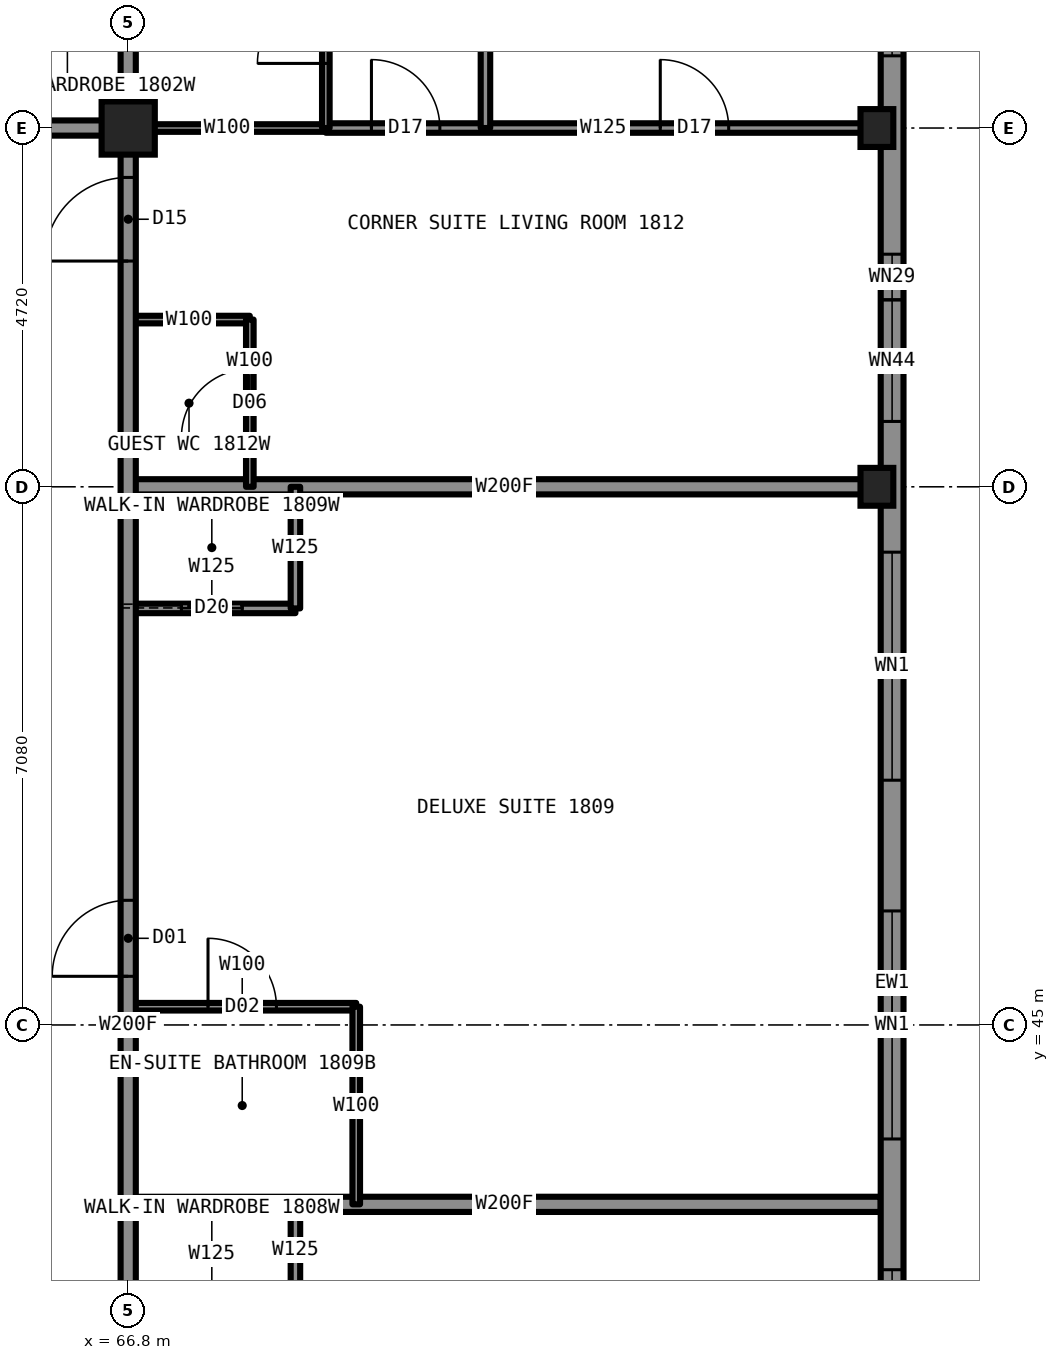
"""IFC4 building model, lengths in metres.
Left out: names, types, materials, properties, quantities, classifications, styles, units other than length and angle.
Written with IfcOpenShell. Run it as: python <this file> out.ifc"""

import sys

from ifc_helpers import new_model, si_unit, direction, frame, frame_2d, origin, origin_2d, place, context, subcontext, project, spatial, rectangle, hollow_rectangle, i_section, extrude, element, fill, save


model = new_model("IFC4")
c1 = context("Model", 3, precision=1e-05, world=origin(), true_north=direction((0.0, 1.0)))
c2 = subcontext(c1, "Body", "Model", "MODEL_VIEW")
j1 = project(units=[si_unit("LENGTHUNIT", "METRE"), si_unit("PLANEANGLEUNIT", "RADIAN")], contexts=[c1])
p1 = place(None, origin())
s1 = spatial("IfcSite", under=j1, at=p1, CompositionType="ELEMENT")
p2 = place(p1, origin())
s2 = spatial("IfcBuilding", under=s1, at=p2, CompositionType="ELEMENT")
p3 = place(p2, frame((0.0, 0.0, 70.5)))
s3 = spatial("IfcBuildingStorey", under=s2, at=p3, CompositionType="ELEMENT", Elevation=70.5)
for number, where, z_axis, x_axis in (
    (1, (76.65, 52.08, 0.0), (0.0, 0.0, 1.0), (1.0, 0.0, 0.0)),
    (2, (76.65, 56.8, 0.0), (0.0, 0.0, 1.0), (1.0, 0.0, 0.0)),
):
    element("IfcColumn", number, at=place(p3, frame(where, z_axis=z_axis, x_axis=x_axis)), inside=s3, PredefinedType="COLUMN", context=c2, shape_type="SweptSolid", body=[
        extrude(i_section(OverallWidth=0.432, OverallDepth=0.498, WebThickness=0.056, FlangeThickness=0.089, at=origin_2d()), origin(), (0.0, 0.0, 1.0), 3.5),
    ])
p4 = place(p3, frame((66.8, 56.8, 0.0), z_axis=(0.0, 0.0, 1.0), x_axis=(1.0, 0.0, 0.0)))
e3 = element("IfcColumn", 3, at=p4, inside=s3, PredefinedType="COLUMN", context=c2, shape_type="SweptSolid", body=[
    extrude(hollow_rectangle(XDim=0.7, YDim=0.7, WallThickness=0.06, at=origin_2d()), origin(), (0.0, 0.0, 1.0), 3.5),
])
p5 = place(p3, frame((66.8, 42.64, 0.0), z_axis=(0.0, 0.0, 1.0), x_axis=(1.0, 0.0, 0.0)))
e4 = element("IfcWall", 4, at=p5, inside=s3, PredefinedType="PARTITIONING", context=c2, shape_type="SweptSolid", body=[
    extrude(rectangle(XDim=9.9, YDim=0.2, at=frame_2d((4.95, 0.0))), origin(), (0.0, 0.0, 1.0), 2.723),
])
p6 = place(p3, frame((66.8, 45.24, 0.0), z_axis=(0.0, 0.0, 1.0), x_axis=(1.0, 0.0, 0.0)))
e5 = element("IfcWall", 5, at=p6, inside=s3, PredefinedType="PARTITIONING", context=c2, shape_type="SweptSolid", body=[
    extrude(rectangle(XDim=3.0, YDim=0.1, at=frame_2d((1.5, 0.0))), origin(), (0.0, 0.0, 1.0), 3.33),
])
p7 = place(p6, frame((1.05, 0.0, 0.0)))
e6 = element("IfcOpeningElement", 6, at=p7, cuts=e5, PredefinedType="OPENING", context=c2, shape_type="SweptSolid", body=[
    extrude(rectangle(XDim=0.9, YDim=2.1, at=frame_2d((0.45, 1.05))), frame((0.0, 0.06, 0.0), z_axis=(0.0, -1.0, 0.0), x_axis=(1.0, 0.0, 0.0)), (0.0, 0.0, 1.0), 0.12),
])
p8 = place(p3, frame((66.8, 56.8, 0.0), z_axis=(0.0, 0.0, 1.0), x_axis=(1.0, 0.0, 0.0)))
e7 = element("IfcWall", 7, at=p8, inside=s3, PredefinedType="PARTITIONING", context=c2, shape_type="SweptSolid", body=[
    extrude(rectangle(XDim=2.6, YDim=0.1, at=frame_2d((1.3, 0.0))), origin(), (0.0, 0.0, 1.0), 2.573),
])
p9 = place(p3, frame((43.2, 56.8, 0.0), z_axis=(0.0, 0.0, 1.0), x_axis=(1.0, 0.0, 0.0)))
e8 = element("IfcWall", 8, at=p9, inside=s3, PredefinedType="PARTITIONING", context=c2, shape_type="SweptSolid", body=[
    extrude(rectangle(XDim=23.6, YDim=0.2, at=frame_2d((11.8, 0.0))), origin(), (0.0, 0.0, 1.0), 3.33),
])
p10 = place(p9, frame((1.85, 0.0, 0.0)))
e9 = element("IfcOpeningElement", 9, at=p10, cuts=e8, PredefinedType="OPENING", context=c2, shape_type="SweptSolid", body=[
    extrude(rectangle(XDim=1.1, YDim=2.2, at=frame_2d((0.55, 1.1))), frame((0.0, 0.11, 0.0), z_axis=(0.0, -1.0, 0.0), x_axis=(1.0, 0.0, 0.0)), (0.0, 0.0, 1.0), 0.22),
])
p11 = place(p9, frame((17.16, 0.0, 0.0)))
e10 = element("IfcOpeningElement", 10, at=p11, cuts=e8, PredefinedType="OPENING", context=c2, shape_type="SweptSolid", body=[
    extrude(rectangle(XDim=1.0, YDim=2.2, at=frame_2d((0.5, 1.1))), frame((0.0, 0.11, 0.0), z_axis=(0.0, -1.0, 0.0), x_axis=(1.0, 0.0, 0.0)), (0.0, 0.0, 1.0), 0.22),
])
p12 = place(p3, frame((69.4, 56.8, 0.0), z_axis=(0.0, 0.0, 1.0), x_axis=(1.0, 0.0, 0.0)))
e11 = element("IfcWall", 11, at=p12, inside=s3, PredefinedType="PARTITIONING", context=c2, shape_type="SweptSolid", body=[
    extrude(rectangle(XDim=7.3, YDim=0.125, at=frame_2d((3.65, 0.0))), origin(), (0.0, 0.0, 1.0), 2.573),
])
p13 = place(p12, frame((0.6, 0.0, 0.0)))
e12 = element("IfcOpeningElement", 12, at=p13, cuts=e11, PredefinedType="OPENING", context=c2, shape_type="SweptSolid", body=[
    extrude(rectangle(XDim=0.9, YDim=2.2, at=frame_2d((0.45, 1.1))), frame((0.0, 0.073, 0.0), z_axis=(0.0, -1.0, 0.0), x_axis=(1.0, 0.0, 0.0)), (0.0, 0.0, 1.0), 0.145),
])
p14 = place(p12, frame((4.4, 0.0, 0.0)))
e13 = element("IfcOpeningElement", 13, at=p14, cuts=e11, PredefinedType="OPENING", context=c2, shape_type="SweptSolid", body=[
    extrude(rectangle(XDim=0.9, YDim=2.2, at=frame_2d((0.45, 1.1))), frame((0.0, 0.073, 0.0), z_axis=(0.0, -1.0, 0.0), x_axis=(1.0, 0.0, 0.0)), (0.0, 0.0, 1.0), 0.145),
])
p15 = place(p3, frame((66.8, 50.48, 0.0), z_axis=(0.0, 0.0, 1.0), x_axis=(1.0, 0.0, 0.0)))
e14 = element("IfcWall", 14, at=p15, inside=s3, PredefinedType="PARTITIONING", context=c2, shape_type="SweptSolid", body=[
    extrude(rectangle(XDim=2.2, YDim=0.125, at=frame_2d((1.1, 0.0))), origin(), (0.0, 0.0, 1.0), 3.33),
])
p16 = place(p15, frame((0.7, 0.0, 0.0)))
e15 = element("IfcOpeningElement", 15, at=p16, cuts=e14, PredefinedType="OPENING", context=c2, shape_type="SweptSolid", body=[
    extrude(rectangle(XDim=0.8, YDim=2.1, at=frame_2d((0.4, 1.05))), frame((0.0, 0.073, 0.0), z_axis=(0.0, -1.0, 0.0), x_axis=(1.0, 0.0, 0.0)), (0.0, 0.0, 1.0), 0.145),
])
p17 = place(p3, frame((66.8, 52.08, 0.0), z_axis=(0.0, 0.0, 1.0), x_axis=(1.0, 0.0, 0.0)))
e16 = element("IfcWall", 16, at=p17, inside=s3, PredefinedType="PARTITIONING", context=c2, shape_type="SweptSolid", body=[
    extrude(rectangle(XDim=9.9, YDim=0.2, at=frame_2d((4.95, 0.0))), origin(), (0.0, 0.0, 1.0), 2.573),
])
p18 = place(p3, frame((66.8, 54.28, 0.0), z_axis=(0.0, 0.0, 1.0), x_axis=(1.0, 0.0, 0.0)))
e17 = element("IfcWall", 17, at=p18, inside=s3, PredefinedType="PARTITIONING", context=c2, shape_type="SweptSolid", body=[
    extrude(rectangle(XDim=1.6, YDim=0.1, at=frame_2d((0.8, 0.0))), origin(), (0.0, 0.0, 1.0), 2.723),
])
p19 = place(p3, frame((66.8, 33.2, 0.0), z_axis=(0.0, 0.0, 1.0), x_axis=(0.0, 1.0, 0.0)))
e18 = element("IfcWall", 18, at=p19, inside=s3, PredefinedType="PARTITIONING", context=c2, shape_type="SweptSolid", body=[
    extrude(rectangle(XDim=23.6, YDim=0.2, at=frame_2d((11.8, 0.0))), origin(), (0.0, 0.0, 1.0), 3.33),
])
p20 = place(p19, frame((6.98, 0.0, 0.0)))
e19 = element("IfcOpeningElement", 19, at=p20, cuts=e18, PredefinedType="OPENING", context=c2, shape_type="SweptSolid", body=[
    extrude(rectangle(XDim=1.0, YDim=2.2, at=frame_2d((0.5, 1.1))), frame((0.0, 0.11, 0.0), z_axis=(0.0, -1.0, 0.0), x_axis=(1.0, 0.0, 0.0)), (0.0, 0.0, 1.0), 0.22),
])
p21 = place(p19, frame((12.44, 0.0, 0.0)))
e20 = element("IfcOpeningElement", 20, at=p21, cuts=e18, PredefinedType="OPENING", context=c2, shape_type="SweptSolid", body=[
    extrude(rectangle(XDim=1.0, YDim=2.2, at=frame_2d((0.5, 1.1))), frame((0.0, 0.11, 0.0), z_axis=(0.0, -1.0, 0.0), x_axis=(1.0, 0.0, 0.0)), (0.0, 0.0, 1.0), 0.22),
])
p22 = place(p19, frame((21.85, 0.0, 0.0)))
e21 = element("IfcOpeningElement", 21, at=p22, cuts=e18, PredefinedType="OPENING", context=c2, shape_type="SweptSolid", body=[
    extrude(rectangle(XDim=1.1, YDim=2.2, at=frame_2d((0.55, 1.1))), frame((0.0, 0.11, 0.0), z_axis=(0.0, -1.0, 0.0), x_axis=(1.0, 0.0, 0.0)), (0.0, 0.0, 1.0), 0.22),
])
p23 = place(p19, frame((0.66, 0.0, 0.0)))
e22 = element("IfcOpeningElement", 22, at=p23, cuts=e18, PredefinedType="OPENING", context=c2, shape_type="SweptSolid", body=[
    extrude(rectangle(XDim=1.1, YDim=2.2, at=frame_2d((0.55, 1.1))), frame((0.0, 0.11, 0.0), z_axis=(0.0, -1.0, 0.0), x_axis=(1.0, 0.0, 0.0)), (0.0, 0.0, 1.0), 0.22),
])
p24 = place(p3, frame((66.8, 56.8, 0.0), z_axis=(0.0, 0.0, 1.0), x_axis=(0.0, 1.0, 0.0)))
e23 = element("IfcWall", 23, at=p24, inside=s3, PredefinedType="PARTITIONING", context=c2, shape_type="SweptSolid", body=[
    extrude(rectangle(XDim=9.9, YDim=0.2, at=frame_2d((4.95, 0.0))), origin(), (0.0, 0.0, 1.0), 2.573),
])
p25 = place(p3, frame((68.4, 52.08, 0.0), z_axis=(0.0, 0.0, 1.0), x_axis=(0.0, 1.0, 0.0)))
e24 = element("IfcWall", 24, at=p25, inside=s3, PredefinedType="PARTITIONING", context=c2, shape_type="SweptSolid", body=[
    extrude(rectangle(XDim=2.2, YDim=0.1, at=frame_2d((1.1, 0.0))), origin(), (0.0, 0.0, 1.0), 3.33),
])
p26 = place(p25, frame((0.65, 0.0, 0.0)))
e25 = element("IfcOpeningElement", 25, at=p26, cuts=e24, PredefinedType="OPENING", context=c2, shape_type="SweptSolid", body=[
    extrude(rectangle(XDim=0.9, YDim=2.1, at=frame_2d((0.45, 1.05))), frame((0.0, 0.06, 0.0), z_axis=(0.0, -1.0, 0.0), x_axis=(1.0, 0.0, 0.0)), (0.0, 0.0, 1.0), 0.12),
])
p27 = place(p3, frame((69.0, 41.44, 0.0), z_axis=(0.0, 0.0, 1.0), x_axis=(0.0, 1.0, 0.0)))
e26 = element("IfcWall", 26, at=p27, inside=s3, PredefinedType="PARTITIONING", context=c2, shape_type="SweptSolid", body=[
    extrude(rectangle(XDim=1.2, YDim=0.125, at=frame_2d((0.6, 0.0))), origin(), (0.0, 0.0, 1.0), 3.33),
])
p28 = place(p3, frame((69.0, 50.48, 0.0), z_axis=(0.0, 0.0, 1.0), x_axis=(0.0, 1.0, 0.0)))
e27 = element("IfcWall", 27, at=p28, inside=s3, PredefinedType="PARTITIONING", context=c2, shape_type="SweptSolid", body=[
    extrude(rectangle(XDim=1.6, YDim=0.125, at=frame_2d((0.8, 0.0))), origin(), (0.0, 0.0, 1.0), 3.33),
])
p29 = place(p3, frame((69.4, 56.8, 0.0), z_axis=(0.0, 0.0, 1.0), x_axis=(0.0, 1.0, 0.0)))
e28 = element("IfcWall", 28, at=p29, inside=s3, PredefinedType="PARTITIONING", context=c2, shape_type="SweptSolid", body=[
    extrude(rectangle(XDim=2.6, YDim=0.1, at=frame_2d((1.3, 0.0))), origin(), (0.0, 0.0, 1.0), 3.33),
])
p30 = place(p29, frame((0.85, 0.0, 0.0)))
e29 = element("IfcOpeningElement", 29, at=p30, cuts=e28, PredefinedType="OPENING", context=c2, shape_type="SweptSolid", body=[
    extrude(rectangle(XDim=0.9, YDim=2.1, at=frame_2d((0.45, 1.05))), frame((0.0, 0.06, 0.0), z_axis=(0.0, -1.0, 0.0), x_axis=(1.0, 0.0, 0.0)), (0.0, 0.0, 1.0), 0.12),
])
p31 = place(p3, frame((69.8, 42.64, 0.0), z_axis=(0.0, 0.0, 1.0), x_axis=(0.0, 1.0, 0.0)))
e30 = element("IfcWall", 30, at=p31, inside=s3, PredefinedType="PARTITIONING", context=c2, shape_type="SweptSolid", body=[
    extrude(rectangle(XDim=2.6, YDim=0.1, at=frame_2d((1.3, 0.0))), origin(), (0.0, 0.0, 1.0), 3.33),
])
p32 = place(p3, frame((71.5, 56.8, 0.0), z_axis=(0.0, 0.0, 1.0), x_axis=(0.0, 1.0, 0.0)))
e31 = element("IfcWall", 31, at=p32, inside=s3, PredefinedType="PARTITIONING", context=c2, shape_type="SweptSolid", body=[
    extrude(rectangle(XDim=9.894, YDim=0.125, at=frame_2d((4.947, 0.0))), origin(), (0.0, 0.0, 1.0), 3.33),
])
p33 = place(p3, frame((76.85, 28.5, 0.0), z_axis=(0.0, 0.0, 1.0), x_axis=(0.0, 1.0, 0.0)))
e32 = element("IfcWall", 32, at=p33, inside=s3, PredefinedType="SOLIDWALL", context=c2, shape_type="SweptSolid", body=[
    extrude(rectangle(XDim=33.0, YDim=0.3, at=frame_2d((16.5, 0.0))), origin(), (0.0, 0.0, 1.0), 2.83),
])
p34 = place(p33, frame((0.85, 0.0, 0.5)))
e33 = element("IfcOpeningElement", 33, at=p34, cuts=e32, PredefinedType="OPENING", context=c2, shape_type="SweptSolid", body=[
    extrude(rectangle(XDim=2.9, YDim=2.0, at=frame_2d((1.45, 1.0))), frame((0.0, 0.16, 0.0), z_axis=(0.0, -1.0, 0.0), x_axis=(1.0, 0.0, 0.0)), (0.0, 0.0, 1.0), 0.32),
])
p35 = place(p33, frame((6.96, 0.0, 0.55)))
e34 = element("IfcOpeningElement", 34, at=p35, cuts=e32, PredefinedType="OPENING", context=c2, shape_type="SweptSolid", body=[
    extrude(rectangle(XDim=1.6, YDim=1.9, at=frame_2d((0.8, 0.95))), frame((0.0, 0.16, 0.0), z_axis=(0.0, -1.0, 0.0), x_axis=(1.0, 0.0, 0.0)), (0.0, 0.0, 1.0), 0.32),
])
p36 = place(p33, frame((10.28, 0.0, 0.5)))
e35 = element("IfcOpeningElement", 35, at=p36, cuts=e32, PredefinedType="OPENING", context=c2, shape_type="SweptSolid", body=[
    extrude(rectangle(XDim=3.0, YDim=2.0, at=frame_2d((1.5, 1.0))), frame((0.0, 0.16, 0.0), z_axis=(0.0, -1.0, 0.0), x_axis=(1.0, 0.0, 0.0)), (0.0, 0.0, 1.0), 0.32),
])
p37 = place(p33, frame((15.0, 0.0, 0.5)))
e36 = element("IfcOpeningElement", 36, at=p37, cuts=e32, PredefinedType="OPENING", context=c2, shape_type="SweptSolid", body=[
    extrude(rectangle(XDim=3.0, YDim=2.0, at=frame_2d((1.5, 1.0))), frame((0.0, 0.16, 0.0), z_axis=(0.0, -1.0, 0.0), x_axis=(1.0, 0.0, 0.0)), (0.0, 0.0, 1.0), 0.32),
])
p38 = place(p33, frame((19.72, 0.0, 0.5)))
e37 = element("IfcOpeningElement", 37, at=p38, cuts=e32, PredefinedType="OPENING", context=c2, shape_type="SweptSolid", body=[
    extrude(rectangle(XDim=3.0, YDim=2.0, at=frame_2d((1.5, 1.0))), frame((0.0, 0.16, 0.0), z_axis=(0.0, -1.0, 0.0), x_axis=(1.0, 0.0, 0.0)), (0.0, 0.0, 1.0), 0.32),
])
p39 = place(p33, frame((24.44, 0.0, 0.55)))
e38 = element("IfcOpeningElement", 38, at=p39, cuts=e32, PredefinedType="OPENING", context=c2, shape_type="SweptSolid", body=[
    extrude(rectangle(XDim=1.6, YDim=1.9, at=frame_2d((0.8, 0.95))), frame((0.0, 0.16, 0.0), z_axis=(0.0, -1.0, 0.0), x_axis=(1.0, 0.0, 0.0)), (0.0, 0.0, 1.0), 0.32),
])
p40 = place(p33, frame((29.25, 0.0, 0.5)))
e39 = element("IfcOpeningElement", 39, at=p40, cuts=e32, PredefinedType="OPENING", context=c2, shape_type="SweptSolid", body=[
    extrude(rectangle(XDim=2.9, YDim=2.0, at=frame_2d((1.45, 1.0))), frame((0.0, 0.16, 0.0), z_axis=(0.0, -1.0, 0.0), x_axis=(1.0, 0.0, 0.0)), (0.0, 0.0, 1.0), 0.32),
])
p41 = place(p33, frame((6.31, 0.0, 1.45)))
e40 = element("IfcOpeningElement", 40, at=p41, cuts=e32, PredefinedType="OPENING", context=c2, shape_type="SweptSolid", body=[
    extrude(rectangle(XDim=0.6, YDim=1.0, at=frame_2d((0.3, 0.5))), frame((0.0, 0.16, 0.0), z_axis=(0.0, -1.0, 0.0), x_axis=(1.0, 0.0, 0.0)), (0.0, 0.0, 1.0), 0.32),
])
p42 = place(p33, frame((26.04, 0.0, 1.45)))
e41 = element("IfcOpeningElement", 41, at=p42, cuts=e32, PredefinedType="OPENING", context=c2, shape_type="SweptSolid", body=[
    extrude(rectangle(XDim=0.6, YDim=1.0, at=frame_2d((0.3, 0.5))), frame((0.0, 0.16, 0.0), z_axis=(0.0, -1.0, 0.0), x_axis=(1.0, 0.0, 0.0)), (0.0, 0.0, 1.0), 0.32),
])
p43 = place(p21, origin())
e42 = element("IfcDoor", 42, at=p43, inside=s3, OperationType="SINGLE_SWING_LEFT", PredefinedType="DOOR", context=c2, shape_type="SweptSolid", body=[
    extrude(rectangle(XDim=1.0, YDim=2.2, at=frame_2d((0.5, 1.1))), frame((0.0, 0.025, 0.0), z_axis=(0.0, -1.0, 0.0), x_axis=(1.0, 0.0, 0.0)), (0.0, 0.0, 1.0), 0.05),
])
fill(e20, e42)
p44 = place(p7, origin())
e43 = element("IfcDoor", 43, at=p44, inside=s3, OperationType="SINGLE_SWING_RIGHT", PredefinedType="DOOR", context=c2, shape_type="SweptSolid", body=[
    extrude(rectangle(XDim=0.9, YDim=2.1, at=frame_2d((0.45, 1.05))), frame((0.0, 0.025, 0.0), z_axis=(0.0, -1.0, 0.0), x_axis=(1.0, 0.0, 0.0)), (0.0, 0.0, 1.0), 0.05),
])
fill(e6, e43)
p45 = place(p16, origin())
e44 = element("IfcDoor", 44, at=p45, inside=s3, OperationType="SLIDING_TO_LEFT", PredefinedType="DOOR", context=c2, shape_type="SweptSolid", body=[
    extrude(rectangle(XDim=0.8, YDim=2.1, at=frame_2d((0.4, 1.05))), frame((0.0, 0.025, 0.0), z_axis=(0.0, -1.0, 0.0), x_axis=(1.0, 0.0, 0.0)), (0.0, 0.0, 1.0), 0.05),
])
fill(e15, e44)
p46 = place(p22, origin())
e45 = element("IfcDoor", 45, at=p46, inside=s3, OperationType="SINGLE_SWING_LEFT", PredefinedType="DOOR", context=c2, shape_type="SweptSolid", body=[
    extrude(rectangle(XDim=1.1, YDim=2.2, at=frame_2d((0.55, 1.1))), frame((0.0, 0.025, 0.0), z_axis=(0.0, -1.0, 0.0), x_axis=(1.0, 0.0, 0.0)), (0.0, 0.0, 1.0), 0.05),
])
fill(e21, e45)
p47 = place(p30, origin())
e46 = element("IfcDoor", 46, at=p47, inside=s3, OperationType="SINGLE_SWING_RIGHT", PredefinedType="DOOR", context=c2, shape_type="SweptSolid", body=[
    extrude(rectangle(XDim=0.9, YDim=2.1, at=frame_2d((0.45, 1.05))), frame((0.0, 0.025, 0.0), z_axis=(0.0, -1.0, 0.0), x_axis=(1.0, 0.0, 0.0)), (0.0, 0.0, 1.0), 0.05),
])
fill(e29, e46)
p48 = place(p13, origin())
e47 = element("IfcDoor", 47, at=p48, inside=s3, OperationType="SINGLE_SWING_LEFT", PredefinedType="DOOR", context=c2, shape_type="SweptSolid", body=[
    extrude(rectangle(XDim=0.9, YDim=2.2, at=frame_2d((0.45, 1.1))), frame((0.0, 0.025, 0.0), z_axis=(0.0, -1.0, 0.0), x_axis=(1.0, 0.0, 0.0)), (0.0, 0.0, 1.0), 0.05),
])
fill(e12, e47)
p49 = place(p14, origin())
e48 = element("IfcDoor", 48, at=p49, inside=s3, OperationType="SINGLE_SWING_LEFT", PredefinedType="DOOR", context=c2, shape_type="SweptSolid", body=[
    extrude(rectangle(XDim=0.9, YDim=2.2, at=frame_2d((0.45, 1.1))), frame((0.0, 0.025, 0.0), z_axis=(0.0, -1.0, 0.0), x_axis=(1.0, 0.0, 0.0)), (0.0, 0.0, 1.0), 0.05),
])
fill(e13, e48)
p50 = place(p26, origin())
e49 = element("IfcDoor", 49, at=p50, inside=s3, OperationType="SINGLE_SWING_LEFT", PredefinedType="DOOR", context=c2, shape_type="SweptSolid", body=[
    extrude(rectangle(XDim=0.9, YDim=2.1, at=frame_2d((0.45, 1.05))), frame((0.0, 0.025, 0.0), z_axis=(0.0, -1.0, 0.0), x_axis=(1.0, 0.0, 0.0)), (0.0, 0.0, 1.0), 0.05),
])
fill(e25, e49)
p51 = place(p36, origin())
e50 = element("IfcWindow", 50, at=p51, inside=s3, PartitioningType="SINGLE_PANEL", PredefinedType="WINDOW", context=c2, shape_type="SweptSolid", body=[
    extrude(rectangle(XDim=3.0, YDim=2.0, at=frame_2d((1.5, 1.0))), frame((0.0, 0.03, 0.0), z_axis=(0.0, -1.0, 0.0), x_axis=(1.0, 0.0, 0.0)), (0.0, 0.0, 1.0), 0.06),
])
fill(e35, e50)
p52 = place(p37, origin())
e51 = element("IfcWindow", 51, at=p52, inside=s3, PartitioningType="SINGLE_PANEL", PredefinedType="WINDOW", context=c2, shape_type="SweptSolid", body=[
    extrude(rectangle(XDim=3.0, YDim=2.0, at=frame_2d((1.5, 1.0))), frame((0.0, 0.03, 0.0), z_axis=(0.0, -1.0, 0.0), x_axis=(1.0, 0.0, 0.0)), (0.0, 0.0, 1.0), 0.06),
])
fill(e36, e51)
p53 = place(p38, origin())
e52 = element("IfcWindow", 52, at=p53, inside=s3, PartitioningType="SINGLE_PANEL", PredefinedType="WINDOW", context=c2, shape_type="SweptSolid", body=[
    extrude(rectangle(XDim=3.0, YDim=2.0, at=frame_2d((1.5, 1.0))), frame((0.0, 0.03, 0.0), z_axis=(0.0, -1.0, 0.0), x_axis=(1.0, 0.0, 0.0)), (0.0, 0.0, 1.0), 0.06),
])
fill(e37, e52)
p54 = place(p39, origin())
e53 = element("IfcWindow", 53, at=p54, inside=s3, PartitioningType="SINGLE_PANEL", PredefinedType="WINDOW", context=c2, shape_type="SweptSolid", body=[
    extrude(rectangle(XDim=1.6, YDim=1.9, at=frame_2d((0.8, 0.95))), frame((0.0, 0.03, 0.0), z_axis=(0.0, -1.0, 0.0), x_axis=(1.0, 0.0, 0.0)), (0.0, 0.0, 1.0), 0.06),
])
fill(e38, e53)
p55 = place(p40, origin())
e54 = element("IfcWindow", 54, at=p55, inside=s3, PartitioningType="SINGLE_PANEL", PredefinedType="WINDOW", context=c2, shape_type="SweptSolid", body=[
    extrude(rectangle(XDim=2.9, YDim=2.0, at=frame_2d((1.45, 1.0))), frame((0.0, 0.03, 0.0), z_axis=(0.0, -1.0, 0.0), x_axis=(1.0, 0.0, 0.0)), (0.0, 0.0, 1.0), 0.06),
])
fill(e39, e54)
p56 = place(p42, origin())
e55 = element("IfcWindow", 55, at=p56, inside=s3, PartitioningType="SINGLE_PANEL", PredefinedType="WINDOW", context=c2, shape_type="SweptSolid", body=[
    extrude(rectangle(XDim=0.6, YDim=1.0, at=frame_2d((0.3, 0.5))), frame((0.0, 0.03, 0.0), z_axis=(0.0, -1.0, 0.0), x_axis=(1.0, 0.0, 0.0)), (0.0, 0.0, 1.0), 0.06),
])
fill(e41, e55)
save(model, sys.argv[1])
